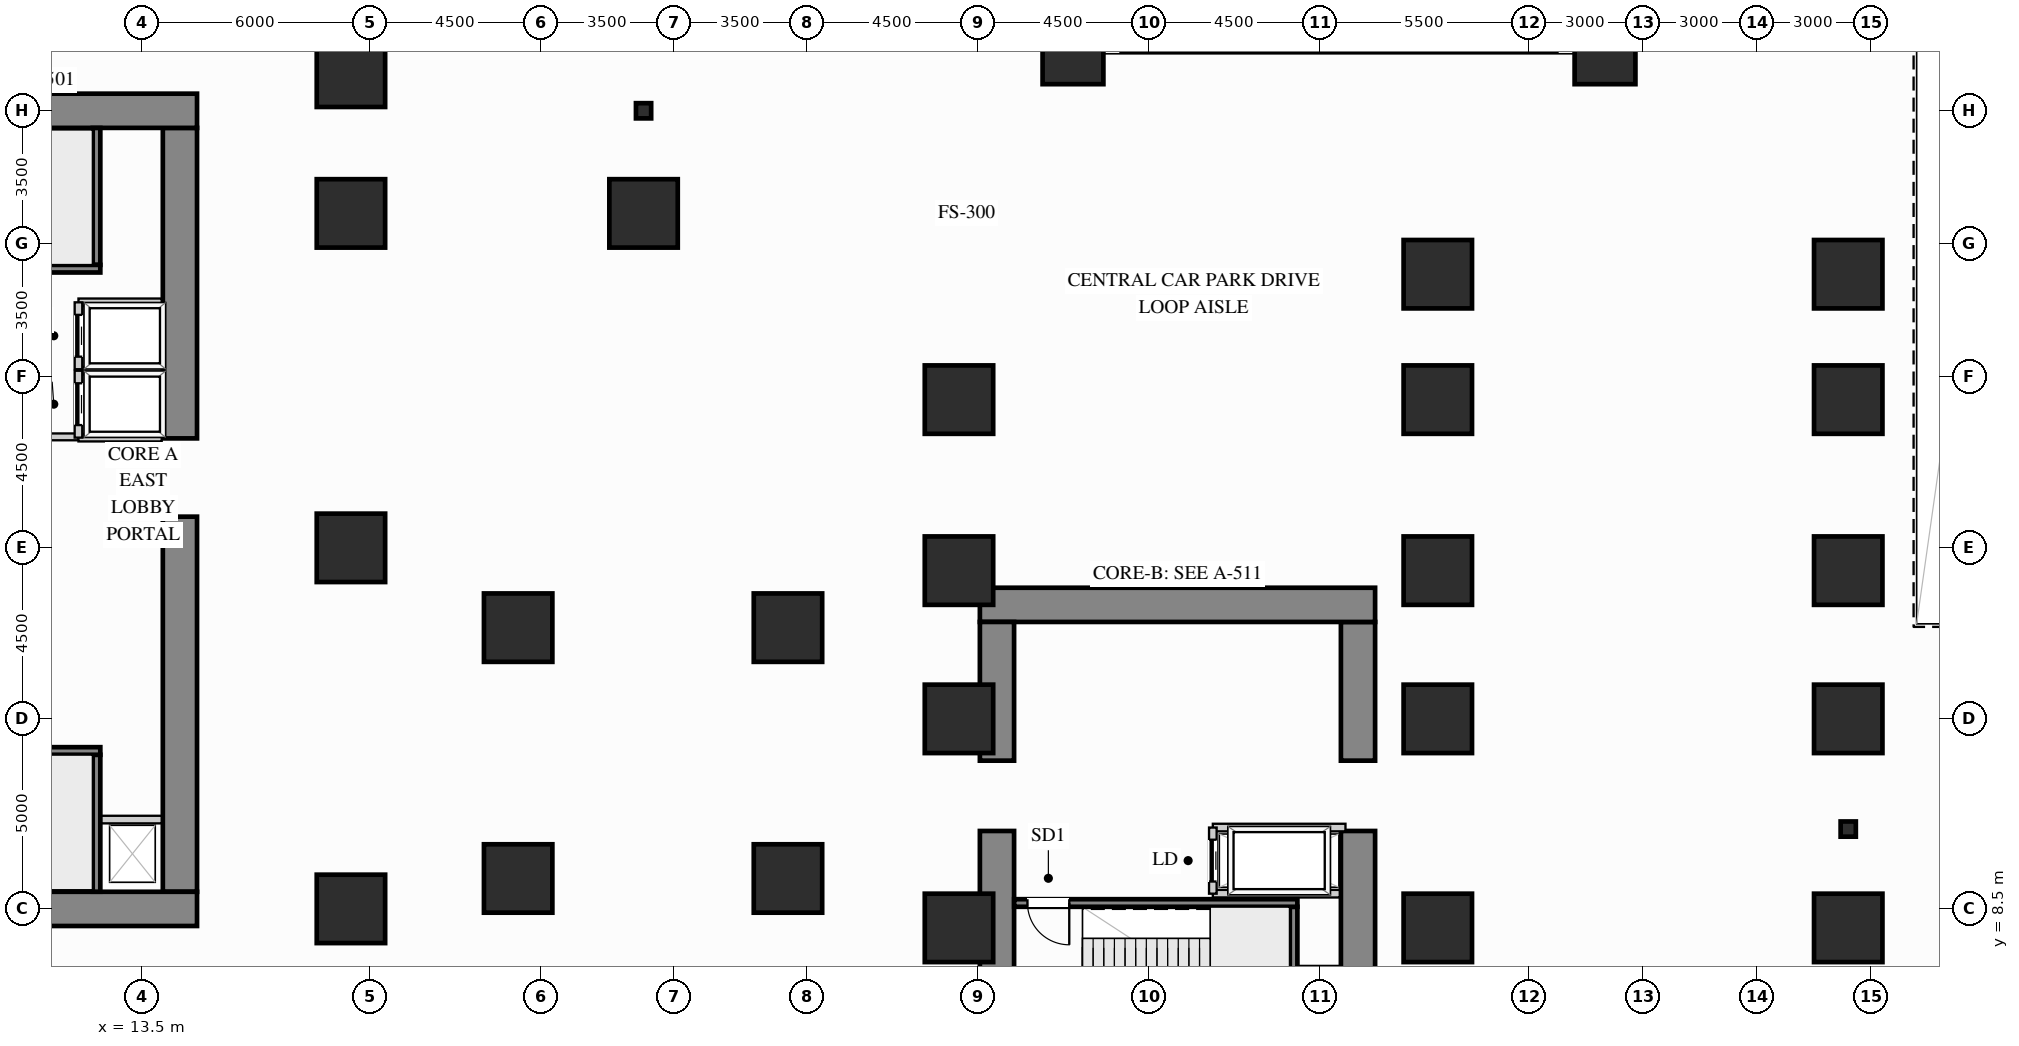
"""IFC4 building model, lengths in metres.
Left out: names, types, materials, properties, quantities, classifications, styles, units other than length and angle.
Written with IfcOpenShell. Run it as: python <this file> out.ifc"""

import sys

from ifc_helpers import new_model, si_unit, direction, frame, frame_2d, origin, origin_2d, place, context, subcontext, project, spatial, rectangle, hollow_rectangle, extrude, source, transform, mapped, element, fill, save


model = new_model("IFC4")
c1 = context("Model", 3, precision=1e-05, world=origin(), true_north=direction((0.0, 1.0)))
c2 = subcontext(c1, "Body", "Model", "MODEL_VIEW")
j1 = project(units=[si_unit("LENGTHUNIT", "METRE"), si_unit("PLANEANGLEUNIT", "RADIAN")], contexts=[c1])
p1 = place(None, origin())
s1 = spatial("IfcSite", under=j1, at=p1, CompositionType="ELEMENT")
p2 = place(p1, origin())
s2 = spatial("IfcBuilding", under=s1, at=p2, CompositionType="ELEMENT")
p3 = place(p2, frame((0.0, 0.0, -4.5)))
s3 = spatial("IfcBuildingStorey", under=s2, at=p3, CompositionType="ELEMENT", Elevation=-4.5)
m1 = source(origin(), c2, "Body", "SweptSolid", [
    extrude(rectangle(XDim=1.6, YDim=1.6, at=origin_2d()), origin(), (0.0, 0.0, 1.0), 4.24),
])
for number, where, z_axis, x_axis in (
    (1, (38.0, 31.0, 0.0), (0.0, 0.0, 1.0), (1.0, 0.0, 0.0)),
    (2, (52.0, 31.0, 0.0), (0.0, 0.0, 1.0), (1.0, 0.0, 0.0)),
):
    element("IfcColumn", number, at=place(p3, frame(where, z_axis=z_axis, x_axis=x_axis)), inside=s3, PredefinedType="COLUMN", context=c2, shape_type="MappedRepresentation", body=[
        mapped(m1, transform((0.0, 0.0, 0.0), x_axis=(1.0, 0.0, 0.0), y_axis=(0.0, 1.0, 0.0), z_axis=(0.0, 0.0, 1.0))),
    ])
m2 = source(origin(), c2, "Body", "SweptSolid", [
    extrude(rectangle(XDim=1.8, YDim=1.8, at=origin_2d()), origin(), (0.0, 0.0, 1.0), 4.24),
])
for number, where, z_axis, x_axis in (
    (3, (26.7, 26.8, 0.0), (0.0, 0.0, 1.0), (1.0, 0.0, 0.0)),
    (4, (58.4, 8.0, 0.0), (0.0, 0.0, 1.0), (1.0, 0.0, 0.0)),
    (5, (58.4, 13.5, 0.0), (0.0, 0.0, 1.0), (1.0, 0.0, 0.0)),
    (6, (58.4, 17.4, 0.0), (0.0, 0.0, 1.0), (1.0, 0.0, 0.0)),
    (7, (58.4, 21.9, 0.0), (0.0, 0.0, 1.0), (1.0, 0.0, 0.0)),
    (8, (58.4, 25.2, 0.0), (0.0, 0.0, 1.0), (1.0, 0.0, 0.0)),
    (9, (47.6, 8.0, 0.0), (0.0, 0.0, 1.0), (1.0, 0.0, 0.0)),
    (10, (47.6, 13.5, 0.0), (0.0, 0.0, 1.0), (1.0, 0.0, 0.0)),
    (11, (47.6, 17.4, 0.0), (0.0, 0.0, 1.0), (1.0, 0.0, 0.0)),
    (12, (47.6, 21.9, 0.0), (0.0, 0.0, 1.0), (1.0, 0.0, 0.0)),
    (13, (47.6, 25.2, 0.0), (0.0, 0.0, 1.0), (1.0, 0.0, 0.0)),
    (14, (19.0, 8.5, 0.0), (0.0, 0.0, 1.0), (1.0, 0.0, 0.0)),
    (15, (19.0, 18.0, 0.0), (0.0, 0.0, 1.0), (1.0, 0.0, 0.0)),
    (16, (19.0, 26.8, 0.0), (0.0, 0.0, 1.0), (1.0, 0.0, 0.0)),
    (17, (19.0, 30.5, 0.0), (0.0, 0.0, 1.0), (1.0, 0.0, 0.0)),
    (18, (35.0, 8.0, 0.0), (0.0, 0.0, 1.0), (1.0, 0.0, 0.0)),
    (19, (35.0, 13.5, 0.0), (0.0, 0.0, 1.0), (1.0, 0.0, 0.0)),
    (20, (35.0, 17.4, 0.0), (0.0, 0.0, 1.0), (1.0, 0.0, 0.0)),
    (21, (35.0, 21.9, 0.0), (0.0, 0.0, 1.0), (1.0, 0.0, 0.0)),
    (22, (23.4, 9.3, 0.0), (0.0, 0.0, 1.0), (1.0, 0.0, 0.0)),
    (23, (30.5, 9.3, 0.0), (0.0, 0.0, 1.0), (1.0, 0.0, 0.0)),
    (24, (23.4, 15.9, 0.0), (0.0, 0.0, 1.0), (1.0, 0.0, 0.0)),
    (25, (30.5, 15.9, 0.0), (0.0, 0.0, 1.0), (1.0, 0.0, 0.0)),
):
    element("IfcColumn", number, at=place(p3, frame(where, z_axis=z_axis, x_axis=x_axis)), inside=s3, PredefinedType="COLUMN", context=c2, shape_type="MappedRepresentation", body=[
        mapped(m2, transform((0.0, 0.0, 0.0), x_axis=(1.0, 0.0, 0.0), y_axis=(0.0, 1.0, 0.0), z_axis=(0.0, 0.0, 1.0))),
    ])
m3 = source(origin(), c2, "Body", "SweptSolid", [
    extrude(hollow_rectangle(XDim=0.4, YDim=0.4, WallThickness=0.02, at=origin_2d()), origin(), (0.0, 0.0, 1.0), 4.24),
])
for number, where, z_axis, x_axis in (
    (26, (26.7, 29.5, 0.0), (0.0, 0.0, 1.0), (1.0, 0.0, 0.0)),
    (27, (58.4, 10.6, 0.0), (0.0, 0.0, 1.0), (1.0, 0.0, 0.0)),
):
    element("IfcColumn", number, at=place(p3, frame(where, z_axis=z_axis, x_axis=x_axis)), inside=s3, PredefinedType="PILASTER", context=c2, shape_type="MappedRepresentation", body=[
        mapped(m3, transform((0.0, 0.0, 0.0), x_axis=(1.0, 0.0, 0.0), y_axis=(0.0, 1.0, 0.0), z_axis=(0.0, 0.0, 1.0))),
    ])
m4 = source(origin(), c2, "Body", "SweptSolid", [
    extrude(rectangle(XDim=9.87, YDim=0.9, at=frame_2d((4.935, 0.0))), origin(), (0.0, 0.0, 1.0), 4.24),
])
p4 = place(p3, frame((14.5, 8.95, 0.0), z_axis=(0.0, 0.0, 1.0), x_axis=(0.0, 1.0, 0.0)))
e28 = element("IfcWall", 28, at=p4, inside=s3, PredefinedType="SHEAR", context=c2, shape_type="MappedRepresentation", body=[
    mapped(m4, transform((0.0, 0.0, 0.0), x_axis=(1.0, 0.0, 0.0), y_axis=(0.0, 1.0, 0.0), z_axis=(0.0, 0.0, 1.0))),
])
m5 = source(origin(), c2, "Body", "SweptSolid", [
    extrude(rectangle(XDim=8.17, YDim=0.9, at=frame_2d((4.085, 0.0))), origin(), (0.0, 0.0, 1.0), 4.24),
])
p5 = place(p3, frame((14.5, 20.88, 0.0), z_axis=(0.0, 0.0, 1.0), x_axis=(0.0, 1.0, 0.0)))
e29 = element("IfcWall", 29, at=p5, inside=s3, PredefinedType="SHEAR", context=c2, shape_type="MappedRepresentation", body=[
    mapped(m5, transform((0.0, 0.0, 0.0), x_axis=(1.0, 0.0, 0.0), y_axis=(0.0, 1.0, 0.0), z_axis=(0.0, 0.0, 1.0))),
])
m6 = source(origin(), c2, "Body", "SweptSolid", [
    extrude(rectangle(XDim=10.9, YDim=0.9, at=frame_2d((5.45, 0.0))), origin(), (0.0, 0.0, 1.0), 4.24),
])
for number, where, z_axis, x_axis in (
    (30, (4.05, 29.5, 0.0), (0.0, 0.0, 1.0), (1.0, 0.0, 0.0)),
    (31, (4.05, 8.5, 0.0), (0.0, 0.0, 1.0), (1.0, 0.0, 0.0)),
):
    element("IfcWall", number, at=place(p3, frame(where, z_axis=z_axis, x_axis=x_axis)), inside=s3, PredefinedType="SHEAR", context=c2, shape_type="MappedRepresentation", body=[
        mapped(m6, transform((0.0, 0.0, 0.0), x_axis=(1.0, 0.0, 0.0), y_axis=(0.0, 1.0, 0.0), z_axis=(0.0, 0.0, 1.0))),
    ])
m7 = source(origin(), c2, "Body", "SweptSolid", [
    extrude(rectangle(XDim=5.6, YDim=0.9, at=frame_2d((2.8, 0.0))), origin(), (0.0, 0.0, 1.0), 4.24),
])
p6 = place(p3, frame((45.5, 4.95, 0.0), z_axis=(0.0, 0.0, 1.0), x_axis=(0.0, 1.0, 0.0)))
e32 = element("IfcWall", 32, at=p6, inside=s3, PredefinedType="SHEAR", context=c2, shape_type="MappedRepresentation", body=[
    mapped(m7, transform((0.0, 0.0, 0.0), x_axis=(1.0, 0.0, 0.0), y_axis=(0.0, 1.0, 0.0), z_axis=(0.0, 0.0, 1.0))),
])
m8 = source(origin(), c2, "Body", "SweptSolid", [
    extrude(rectangle(XDim=3.65, YDim=0.9, at=frame_2d((1.825, 0.0))), origin(), (0.0, 0.0, 1.0), 4.24),
])
p7 = place(p3, frame((45.5, 12.4, 0.0), z_axis=(0.0, 0.0, 1.0), x_axis=(0.0, 1.0, 0.0)))
e33 = element("IfcWall", 33, at=p7, inside=s3, PredefinedType="SHEAR", context=c2, shape_type="MappedRepresentation", body=[
    mapped(m8, transform((0.0, 0.0, 0.0), x_axis=(1.0, 0.0, 0.0), y_axis=(0.0, 1.0, 0.0), z_axis=(0.0, 0.0, 1.0))),
])
m9 = source(origin(), c2, "Body", "SweptSolid", [
    extrude(rectangle(XDim=10.4, YDim=0.9, at=frame_2d((5.2, 0.0))), origin(), (0.0, 0.0, 1.0), 4.24),
])
p8 = place(p3, frame((35.55, 16.5, 0.0), z_axis=(0.0, 0.0, 1.0), x_axis=(1.0, 0.0, 0.0)))
e34 = element("IfcWall", 34, at=p8, inside=s3, PredefinedType="SHEAR", context=c2, shape_type="MappedRepresentation", body=[
    mapped(m9, transform((0.0, 0.0, 0.0), x_axis=(1.0, 0.0, 0.0), y_axis=(0.0, 1.0, 0.0), z_axis=(0.0, 0.0, 1.0))),
])
p9 = place(p3, frame((36.0, 4.95, 0.0), z_axis=(0.0, 0.0, 1.0), x_axis=(0.0, 1.0, 0.0)))
e35 = element("IfcWall", 35, at=p9, inside=s3, PredefinedType="SHEAR", context=c2, shape_type="MappedRepresentation", body=[
    mapped(m7, transform((0.0, 0.0, 0.0), x_axis=(1.0, 0.0, 0.0), y_axis=(0.0, 1.0, 0.0), z_axis=(0.0, 0.0, 1.0))),
])
p10 = place(p3, frame((36.0, 12.4, 0.0), z_axis=(0.0, 0.0, 1.0), x_axis=(0.0, 1.0, 0.0)))
e36 = element("IfcWall", 36, at=p10, inside=s3, PredefinedType="SHEAR", context=c2, shape_type="MappedRepresentation", body=[
    mapped(m8, transform((0.0, 0.0, 0.0), x_axis=(1.0, 0.0, 0.0), y_axis=(0.0, 1.0, 0.0), z_axis=(0.0, 0.0, 1.0))),
])
p11 = place(p3, frame((7.15, 20.92, 0.0), z_axis=(0.0, 0.0, 1.0), x_axis=(1.0, 0.0, 0.0)))
e37 = element("IfcWall", 37, at=p11, inside=s3, PredefinedType="PARTITIONING", context=c2, shape_type="SweptSolid", body=[
    extrude(rectangle(XDim=4.68, YDim=0.18, at=frame_2d((2.34, 0.0))), origin(), (0.0, 0.0, 1.0), 4.225),
])
p12 = place(p11, frame((2.2, 0.0, 0.0)))
e38 = element("IfcOpeningElement", 38, at=p12, cuts=e37, PredefinedType="OPENING", context=c2, shape_type="SweptSolid", body=[
    extrude(rectangle(XDim=1.1, YDim=2.15, at=frame_2d((0.55, 1.075))), frame((0.0, 0.1, 0.0), z_axis=(0.0, -1.0, 0.0), x_axis=(1.0, 0.0, 0.0)), (0.0, 0.0, 1.0), 0.2),
])
m10 = source(origin(), c2, "Body", "SweptSolid", [
    extrude(rectangle(XDim=1.6, YDim=0.2, at=frame_2d((0.8, 0.0))), origin(), (0.0, 0.0, 1.0), 4.225),
])
p13 = place(p3, frame((12.42, 10.85, 0.0), z_axis=(0.0, 0.0, 1.0), x_axis=(1.0, 0.0, 0.0)))
e39 = element("IfcWall", 39, at=p13, inside=s3, PredefinedType="PARTITIONING", context=c2, shape_type="MappedRepresentation", body=[
    mapped(m10, transform((0.0, 0.0, 0.0), x_axis=(1.0, 0.0, 0.0), y_axis=(0.0, 1.0, 0.0), z_axis=(0.0, 0.0, 1.0))),
])
m11 = source(origin(), c2, "Body", "SweptSolid", [
    extrude(rectangle(XDim=2.19, YDim=0.2, at=frame_2d((1.095, 0.0))), origin(), (0.0, 0.0, 1.0), 4.225),
])
for number, where, z_axis, x_axis in (
    (40, (11.83, 22.66, 0.0), (0.0, 0.0, 1.0), (1.0, 0.0, 0.0)),
    (41, (11.83, 20.9, 0.0), (0.0, 0.0, 1.0), (1.0, 0.0, 0.0)),
):
    element("IfcWall", number, at=place(p3, frame(where, z_axis=z_axis, x_axis=x_axis)), inside=s3, PredefinedType="PARTITIONING", context=c2, shape_type="MappedRepresentation", body=[
        mapped(m11, transform((0.0, 0.0, 0.0), x_axis=(1.0, 0.0, 0.0), y_axis=(0.0, 1.0, 0.0), z_axis=(0.0, 0.0, 1.0))),
    ])
p14 = place(p3, frame((11.83, 20.9, 0.0), z_axis=(0.0, 0.0, 1.0), x_axis=(0.0, 1.0, 0.0)))
e42 = element("IfcWall", 42, at=p14, inside=s3, PredefinedType="PARTITIONING", context=c2, shape_type="SweptSolid", body=[
    extrude(rectangle(XDim=1.76, YDim=0.2, at=frame_2d((0.88, 0.0))), origin(), (0.0, 0.0, 1.0), 4.225),
])
p15 = place(p14, frame((0.33, 0.0, 0.0)))
e43 = element("IfcOpeningElement", 43, at=p15, cuts=e42, PredefinedType="OPENING", context=c2, shape_type="SweptSolid", body=[
    extrude(rectangle(XDim=1.1, YDim=2.2, at=frame_2d((0.55, 1.1))), frame((0.0, 0.11, 0.0), z_axis=(0.0, -1.0, 0.0), x_axis=(1.0, 0.0, 0.0)), (0.0, 0.0, 1.0), 0.22),
])
p16 = place(p3, frame((11.83, 24.46, 0.0), z_axis=(0.0, 0.0, 1.0), x_axis=(1.0, 0.0, 0.0)))
e44 = element("IfcWall", 44, at=p16, inside=s3, PredefinedType="PARTITIONING", context=c2, shape_type="MappedRepresentation", body=[
    mapped(m11, transform((0.0, 0.0, 0.0), x_axis=(1.0, 0.0, 0.0), y_axis=(0.0, 1.0, 0.0), z_axis=(0.0, 0.0, 1.0))),
])
p17 = place(p3, frame((11.83, 22.7, 0.0), z_axis=(0.0, 0.0, 1.0), x_axis=(0.0, 1.0, 0.0)))
e45 = element("IfcWall", 45, at=p17, inside=s3, PredefinedType="PARTITIONING", context=c2, shape_type="SweptSolid", body=[
    extrude(rectangle(XDim=1.76, YDim=0.2, at=frame_2d((0.88, 0.0))), origin(), (0.0, 0.0, 1.0), 4.225),
])
p18 = place(p17, frame((0.33, 0.0, 0.0)))
e46 = element("IfcOpeningElement", 46, at=p18, cuts=e45, PredefinedType="OPENING", context=c2, shape_type="SweptSolid", body=[
    extrude(rectangle(XDim=1.1, YDim=2.2, at=frame_2d((0.55, 1.1))), frame((0.0, 0.11, 0.0), z_axis=(0.0, -1.0, 0.0), x_axis=(1.0, 0.0, 0.0)), (0.0, 0.0, 1.0), 0.22),
])
m12 = source(origin(), c2, "Body", "SweptSolid", [
    extrude(rectangle(XDim=3.49, YDim=0.2, at=frame_2d((1.745, 0.0))), origin(), (0.0, 0.0, 1.0), 4.225),
])
p19 = place(p3, frame((41.68, 10.64, 0.0), z_axis=(0.0, 0.0, 1.0), x_axis=(1.0, 0.0, 0.0)))
e47 = element("IfcWall", 47, at=p19, inside=s3, PredefinedType="PARTITIONING", context=c2, shape_type="MappedRepresentation", body=[
    mapped(m12, transform((0.0, 0.0, 0.0), x_axis=(1.0, 0.0, 0.0), y_axis=(0.0, 1.0, 0.0), z_axis=(0.0, 0.0, 1.0))),
])
m13 = source(origin(), c2, "Body", "SweptSolid", [
    extrude(rectangle(XDim=3.34, YDim=0.2, at=frame_2d((1.67, 0.0))), origin(), (0.0, 0.0, 1.0), 4.225),
])
p20 = place(p3, frame((41.68, 8.9, 0.0), z_axis=(0.0, 0.0, 1.0), x_axis=(1.0, 0.0, 0.0)))
e48 = element("IfcWall", 48, at=p20, inside=s3, PredefinedType="PARTITIONING", context=c2, shape_type="MappedRepresentation", body=[
    mapped(m13, transform((0.0, 0.0, 0.0), x_axis=(1.0, 0.0, 0.0), y_axis=(0.0, 1.0, 0.0), z_axis=(0.0, 0.0, 1.0))),
])
p21 = place(p3, frame((41.68, 8.9, 0.0), z_axis=(0.0, 0.0, 1.0), x_axis=(0.0, 1.0, 0.0)))
e49 = element("IfcWall", 49, at=p21, inside=s3, PredefinedType="PARTITIONING", context=c2, shape_type="SweptSolid", body=[
    extrude(rectangle(XDim=1.74, YDim=0.2, at=frame_2d((0.87, 0.0))), origin(), (0.0, 0.0, 1.0), 4.225),
])
p22 = place(p21, frame((0.32, 0.0, 0.0)))
e50 = element("IfcOpeningElement", 50, at=p22, cuts=e49, PredefinedType="OPENING", context=c2, shape_type="SweptSolid", body=[
    extrude(rectangle(XDim=1.1, YDim=2.2, at=frame_2d((0.55, 1.1))), frame((0.0, 0.11, 0.0), z_axis=(0.0, -1.0, 0.0), x_axis=(1.0, 0.0, 0.0)), (0.0, 0.0, 1.0), 0.22),
])
m14 = source(origin(), c2, "Body", "SweptSolid", [
    extrude(rectangle(XDim=3.603, YDim=0.2, at=frame_2d((1.802, 0.0))), origin(), (0.0, 0.0, 1.0), 4.24),
])
p23 = place(p3, frame((12.305, 8.952, 0.0), z_axis=(0.0, 0.0, 1.0), x_axis=(0.0, 1.0, 0.0)))
e51 = element("IfcWall", 51, at=p23, inside=s3, PredefinedType="SHEAR", context=c2, shape_type="MappedRepresentation", body=[
    mapped(m14, transform((0.0, 0.0, 0.0), x_axis=(1.0, 0.0, 0.0), y_axis=(0.0, 1.0, 0.0), z_axis=(0.0, 0.0, 1.0))),
])
p24 = place(p3, frame((4.952, 12.655, 0.0), z_axis=(0.0, 0.0, 1.0), x_axis=(1.0, 0.0, 0.0)))
e52 = element("IfcWall", 52, at=p24, inside=s3, PredefinedType="SHEAR", context=c2, shape_type="SweptSolid", body=[
    extrude(rectangle(XDim=7.453, YDim=0.2, at=frame_2d((3.727, 0.0))), origin(), (0.0, 0.0, 1.0), 4.24),
])
p25 = place(p24, frame((0.4, 0.0, 0.0)))
e53 = element("IfcOpeningElement", 53, at=p25, cuts=e52, PredefinedType="OPENING", context=c2, shape_type="SweptSolid", body=[
    extrude(rectangle(XDim=1.1, YDim=2.15, at=frame_2d((0.55, 1.075))), frame((0.0, 0.11, 0.0), z_axis=(0.0, -1.0, 0.0), x_axis=(1.0, 0.0, 0.0)), (0.0, 0.0, 1.0), 0.22),
])
p26 = place(p3, frame((12.305, 25.445, 0.0), z_axis=(0.0, 0.0, 1.0), x_axis=(0.0, 1.0, 0.0)))
e54 = element("IfcWall", 54, at=p26, inside=s3, PredefinedType="SHEAR", context=c2, shape_type="MappedRepresentation", body=[
    mapped(m14, transform((0.0, 0.0, 0.0), x_axis=(1.0, 0.0, 0.0), y_axis=(0.0, 1.0, 0.0), z_axis=(0.0, 0.0, 1.0))),
])
p27 = place(p3, frame((4.952, 25.345, 0.0), z_axis=(0.0, 0.0, 1.0), x_axis=(1.0, 0.0, 0.0)))
e55 = element("IfcWall", 55, at=p27, inside=s3, PredefinedType="SHEAR", context=c2, shape_type="SweptSolid", body=[
    extrude(rectangle(XDim=7.453, YDim=0.2, at=frame_2d((3.727, 0.0))), origin(), (0.0, 0.0, 1.0), 4.24),
])
p28 = place(p27, frame((0.4, 0.0, 0.0)))
e56 = element("IfcOpeningElement", 56, at=p28, cuts=e55, PredefinedType="OPENING", context=c2, shape_type="SweptSolid", body=[
    extrude(rectangle(XDim=1.1, YDim=2.15, at=frame_2d((0.55, 1.075))), frame((0.0, 0.11, 0.0), z_axis=(0.0, -1.0, 0.0), x_axis=(1.0, 0.0, 0.0)), (0.0, 0.0, 1.0), 0.22),
])
p29 = place(p3, frame((43.805, 4.952, 0.0), z_axis=(0.0, 0.0, 1.0), x_axis=(0.0, 1.0, 0.0)))
e57 = element("IfcWall", 57, at=p29, inside=s3, PredefinedType="SHEAR", context=c2, shape_type="MappedRepresentation", body=[
    mapped(m14, transform((0.0, 0.0, 0.0), x_axis=(1.0, 0.0, 0.0), y_axis=(0.0, 1.0, 0.0), z_axis=(0.0, 0.0, 1.0))),
])
p30 = place(p3, frame((36.452, 8.655, 0.0), z_axis=(0.0, 0.0, 1.0), x_axis=(1.0, 0.0, 0.0)))
e58 = element("IfcWall", 58, at=p30, inside=s3, PredefinedType="SHEAR", context=c2, shape_type="SweptSolid", body=[
    extrude(rectangle(XDim=7.453, YDim=0.2, at=frame_2d((3.727, 0.0))), origin(), (0.0, 0.0, 1.0), 4.24),
])
p31 = place(p30, frame((0.35, 0.0, 0.0)))
e59 = element("IfcOpeningElement", 59, at=p31, cuts=e58, PredefinedType="OPENING", context=c2, shape_type="SweptSolid", body=[
    extrude(rectangle(XDim=1.1, YDim=2.15, at=frame_2d((0.55, 1.075))), frame((0.0, 0.11, 0.0), z_axis=(0.0, -1.0, 0.0), x_axis=(1.0, 0.0, 0.0)), (0.0, 0.0, 1.0), 0.22),
])
m15 = source(origin(), c2, "Body", "SweptSolid", [
    extrude(rectangle(XDim=1.1, YDim=2.2, at=frame_2d((0.55, 1.1))), frame((0.0, 0.025, 0.0), z_axis=(0.0, -1.0, 0.0), x_axis=(1.0, 0.0, 0.0)), (0.0, 0.0, 1.0), 0.05),
])
p32 = place(p15, origin())
e60 = element("IfcDoor", 60, at=p32, inside=s3, OperationType="SLIDING_TO_LEFT", PredefinedType="DOOR", context=c2, shape_type="MappedRepresentation", body=[
    mapped(m15, transform((0.0, 0.0, 0.0), x_axis=(1.0, 0.0, 0.0), y_axis=(0.0, 1.0, 0.0), z_axis=(0.0, 0.0, 1.0))),
])
fill(e43, e60)
p33 = place(p18, origin())
e61 = element("IfcDoor", 61, at=p33, inside=s3, OperationType="SLIDING_TO_LEFT", PredefinedType="DOOR", context=c2, shape_type="MappedRepresentation", body=[
    mapped(m15, transform((0.0, 0.0, 0.0), x_axis=(1.0, 0.0, 0.0), y_axis=(0.0, 1.0, 0.0), z_axis=(0.0, 0.0, 1.0))),
])
fill(e46, e61)
p34 = place(p22, origin())
e62 = element("IfcDoor", 62, at=p34, inside=s3, OperationType="SLIDING_TO_LEFT", PredefinedType="DOOR", context=c2, shape_type="MappedRepresentation", body=[
    mapped(m15, transform((0.0, 0.0, 0.0), x_axis=(1.0, 0.0, 0.0), y_axis=(0.0, 1.0, 0.0), z_axis=(0.0, 0.0, 1.0))),
])
fill(e50, e62)
m16 = source(origin(), c2, "Body", "SweptSolid", [
    extrude(rectangle(XDim=1.1, YDim=2.15, at=frame_2d((0.55, 1.075))), frame((0.0, 0.025, 0.0), z_axis=(0.0, -1.0, 0.0), x_axis=(1.0, 0.0, 0.0)), (0.0, 0.0, 1.0), 0.05),
])
p35 = place(p31, origin())
e63 = element("IfcDoor", 63, at=p35, inside=s3, OperationType="SINGLE_SWING_RIGHT", PredefinedType="DOOR", context=c2, shape_type="MappedRepresentation", body=[
    mapped(m16, transform((0.0, 0.0, 0.0), x_axis=(1.0, 0.0, 0.0), y_axis=(0.0, 1.0, 0.0), z_axis=(0.0, 0.0, 1.0))),
])
fill(e59, e63)
save(model, sys.argv[1])
